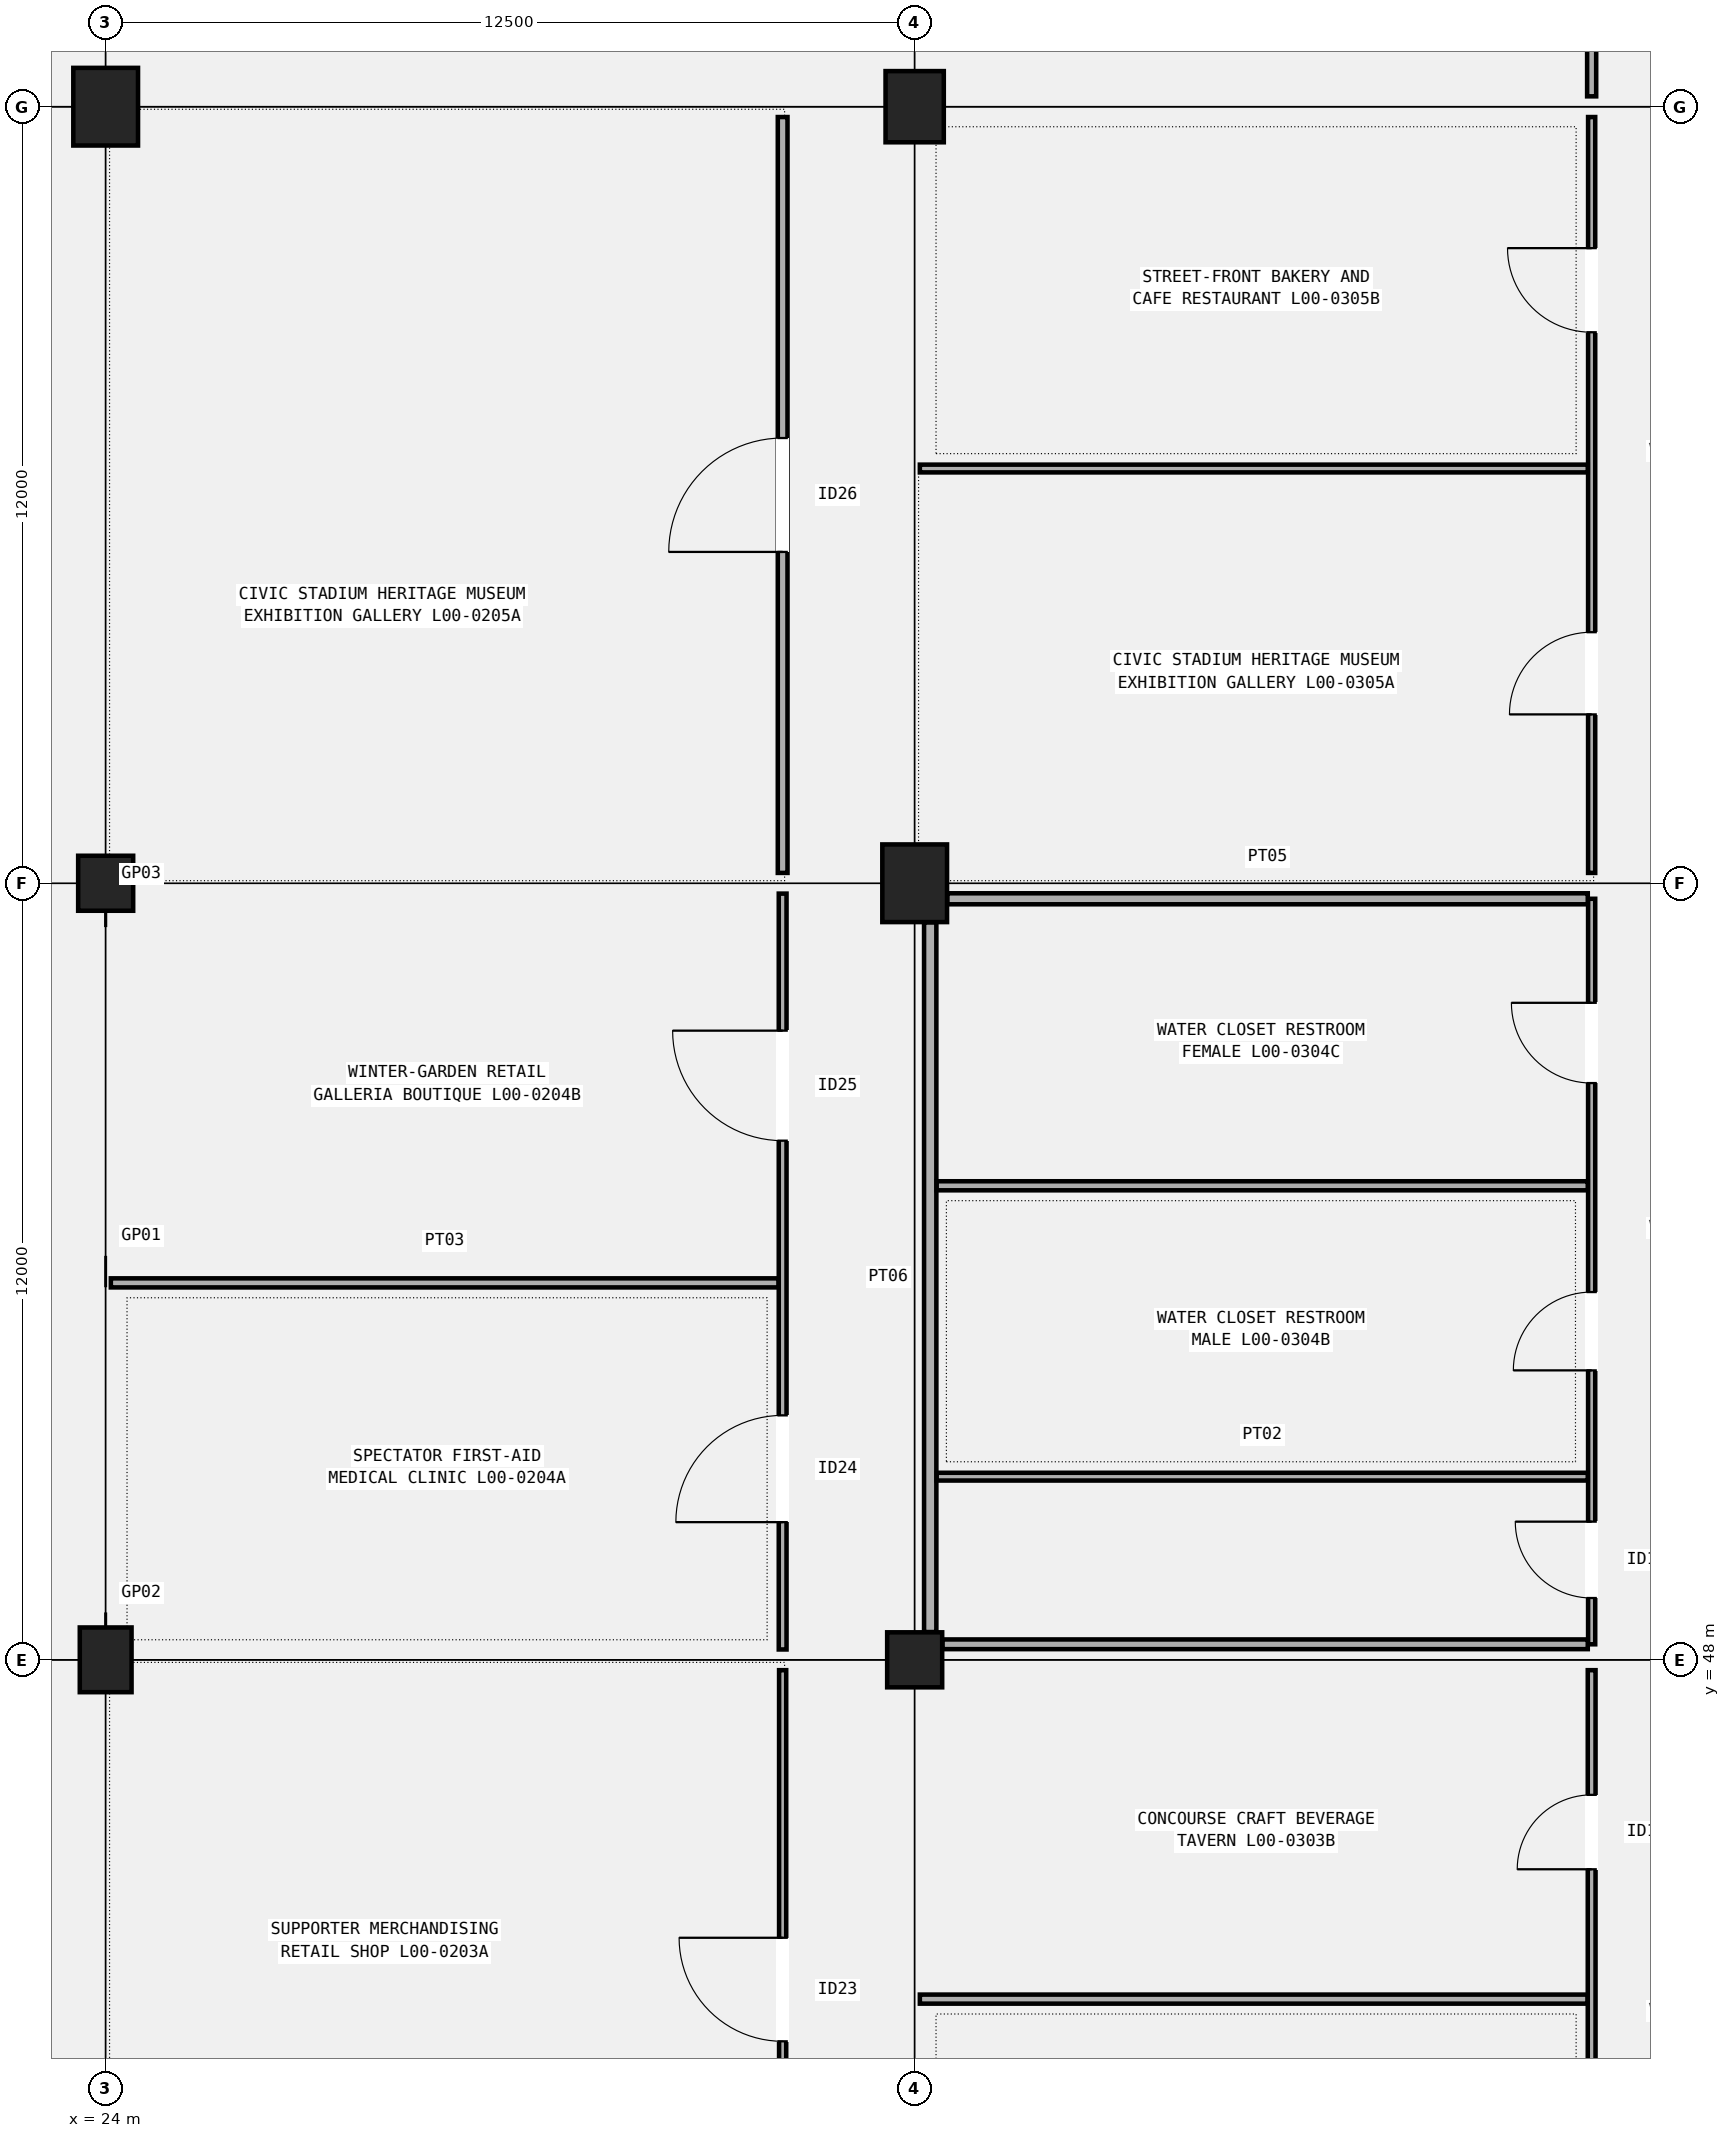
"""IFC4 building model, lengths in metres.
Left out: names, types, materials, properties, quantities, classifications, styles, units other than length and angle.
Written with IfcOpenShell. Run it as: python <this file> out.ifc"""

import sys

from ifc_helpers import new_model, si_unit, direction, frame, frame_2d, origin, origin_2d, place, context, subcontext, project, spatial, rectangle, circle, extrude, element, fill, save


model = new_model("IFC4")
c1 = context("Model", 3, precision=1e-05, world=origin(), true_north=direction((0.0, 1.0)))
c2 = subcontext(c1, "Body", "Model", "MODEL_VIEW")
j1 = project(units=[si_unit("LENGTHUNIT", "METRE"), si_unit("PLANEANGLEUNIT", "RADIAN")], contexts=[c1])
p1 = place(None, origin())
s1 = spatial("IfcSite", under=j1, at=p1, CompositionType="ELEMENT")
p2 = place(p1, origin())
s2 = spatial("IfcBuilding", under=s1, at=p2, CompositionType="ELEMENT")
p3 = place(p2, origin())
s3 = spatial("IfcBuildingStorey", under=s2, at=p3, CompositionType="ELEMENT", Elevation=0.0)
p4 = place(p3, frame((24.0, 48.0, 0.0), z_axis=(0.0, 0.0, 1.0), x_axis=(1.0, 0.0, 0.0)))
e1 = element("IfcColumn", 1, at=p4, inside=s3, PredefinedType="COLUMN", context=c2, shape_type="SweptSolid", body=[
    extrude(rectangle(XDim=0.8, YDim=1.0, at=origin_2d()), origin(), (0.0, 0.0, 1.0), 5.4),
])
p5 = place(p3, frame((24.0, 60.0, 0.0), z_axis=(0.0, 0.0, 1.0), x_axis=(1.0, 0.0, 0.0)))
e2 = element("IfcColumn", 2, at=p5, inside=s3, PredefinedType="COLUMN", context=c2, shape_type="SweptSolid", body=[
    extrude(circle(Radius=0.425, at=origin_2d()), origin(), (0.0, 0.0, 1.0), 5.4),
])
p6 = place(p3, frame((24.0, 72.0, 0.0), z_axis=(0.0, 0.0, 1.0), x_axis=(1.0, 0.0, 0.0)))
e3 = element("IfcColumn", 3, at=p6, inside=s3, PredefinedType="COLUMN", context=c2, shape_type="SweptSolid", body=[
    extrude(rectangle(XDim=1.0, YDim=1.2, at=origin_2d()), origin(), (0.0, 0.0, 1.0), 5.4),
])
p7 = place(p3, frame((36.5, 48.0, 0.0), z_axis=(0.0, 0.0, 1.0), x_axis=(1.0, 0.0, 0.0)))
e4 = element("IfcColumn", 4, at=p7, inside=s3, PredefinedType="COLUMN", context=c2, shape_type="SweptSolid", body=[
    extrude(circle(Radius=0.425, at=origin_2d()), origin(), (0.0, 0.0, 1.0), 5.4),
])
p8 = place(p3, frame((36.5, 60.0, 0.0), z_axis=(0.0, 0.0, 1.0), x_axis=(1.0, 0.0, 0.0)))
e5 = element("IfcColumn", 5, at=p8, inside=s3, PredefinedType="COLUMN", context=c2, shape_type="SweptSolid", body=[
    extrude(rectangle(XDim=1.0, YDim=1.2, at=origin_2d()), origin(), (0.0, 0.0, 1.0), 5.4),
])
p9 = place(p3, frame((36.5, 72.0, 0.0), z_axis=(0.0, 0.0, 1.0), x_axis=(1.0, 0.0, 0.0)))
e6 = element("IfcColumn", 6, at=p9, inside=s3, PredefinedType="COLUMN", context=c2, shape_type="SweptSolid", body=[
    extrude(rectangle(XDim=0.9, YDim=1.1, at=origin_2d()), origin(), (0.0, 0.0, 1.0), 5.4),
])
p10 = place(p3, frame((34.46, 37.97, 0.0), z_axis=(0.0, 0.0, 1.0), x_axis=(0.0, 1.0, 0.0)))
e7 = element("IfcWall", 7, at=p10, inside=s3, PredefinedType="PARTITIONING", context=c2, shape_type="SweptSolid", body=[
    extrude(rectangle(XDim=9.87, YDim=0.11, at=frame_2d((4.935, 0.0))), origin(), (0.0, 0.0, 1.0), 4.52),
])
p11 = place(p10, frame((4.135, 0.0, 0.0)))
e8 = element("IfcOpeningElement", 8, at=p11, cuts=e7, PredefinedType="OPENING", context=c2, shape_type="SweptSolid", body=[
    extrude(rectangle(XDim=1.6, YDim=2.3, at=frame_2d((0.8, 1.15))), frame((0.0, 0.065, 0.0), z_axis=(0.0, -1.0, 0.0), x_axis=(1.0, 0.0, 0.0)), (0.0, 0.0, 1.0), 0.13),
])
p12 = place(p3, frame((34.46, 48.16, 0.0), z_axis=(0.0, 0.0, 1.0), x_axis=(0.0, 1.0, 0.0)))
e9 = element("IfcWall", 9, at=p12, inside=s3, PredefinedType="PARTITIONING", context=c2, shape_type="SweptSolid", body=[
    extrude(rectangle(XDim=11.68, YDim=0.12, at=frame_2d((5.84, 0.0))), origin(), (0.0, 0.0, 1.0), 4.52),
])
p13 = place(p12, frame((1.967, 0.0, 0.0)))
e10 = element("IfcOpeningElement", 10, at=p13, cuts=e9, PredefinedType="OPENING", context=c2, shape_type="SweptSolid", body=[
    extrude(rectangle(XDim=1.65, YDim=2.28, at=frame_2d((0.825, 1.14))), frame((0.0, 0.07, 0.0), z_axis=(0.0, -1.0, 0.0), x_axis=(1.0, 0.0, 0.0)), (0.0, 0.0, 1.0), 0.14),
])
p14 = place(p12, frame((7.862, 0.0, 0.0)))
e11 = element("IfcOpeningElement", 11, at=p14, cuts=e9, PredefinedType="OPENING", context=c2, shape_type="SweptSolid", body=[
    extrude(rectangle(XDim=1.7, YDim=2.32, at=frame_2d((0.85, 1.16))), frame((0.0, 0.07, 0.0), z_axis=(0.0, -1.0, 0.0), x_axis=(1.0, 0.0, 0.0)), (0.0, 0.0, 1.0), 0.14),
])
p15 = place(p3, frame((24.08, 53.825, 0.0), z_axis=(0.0, 0.0, 1.0), x_axis=(1.0, 0.0, 0.0)))
e12 = element("IfcWall", 12, at=p15, inside=s3, PredefinedType="PARTITIONING", context=c2, shape_type="SweptSolid", body=[
    extrude(rectangle(XDim=10.315, YDim=0.14, at=frame_2d((5.157, 0.0))), origin(), (0.0, 0.0, 1.0), 4.52),
])
p16 = place(p3, frame((34.46, 60.16, 0.0), z_axis=(0.0, 0.0, 1.0), x_axis=(0.0, 1.0, 0.0)))
e13 = element("IfcWall", 13, at=p16, inside=s3, PredefinedType="PARTITIONING", context=c2, shape_type="SweptSolid", body=[
    extrude(rectangle(XDim=11.68, YDim=0.15, at=frame_2d((5.84, 0.0))), origin(), (0.0, 0.0, 1.0), 4.52),
])
p17 = place(p16, frame((4.96, 0.0, 0.0)))
e14 = element("IfcOpeningElement", 14, at=p17, cuts=e13, PredefinedType="OPENING", context=c2, shape_type="SweptSolid", body=[
    extrude(rectangle(XDim=1.76, YDim=2.3, at=frame_2d((0.88, 1.15))), frame((0.0, 0.085, 0.0), z_axis=(0.0, -1.0, 0.0), x_axis=(1.0, 0.0, 0.0)), (0.0, 0.0, 1.0), 0.17),
])
p18 = place(p3, frame((46.96, 37.97, 0.0), z_axis=(0.0, 0.0, 1.0), x_axis=(0.0, 1.0, 0.0)))
e15 = element("IfcWall", 15, at=p18, inside=s3, PredefinedType="PARTITIONING", context=c2, shape_type="SweptSolid", body=[
    extrude(rectangle(XDim=9.87, YDim=0.12, at=frame_2d((4.935, 0.0))), origin(), (0.0, 0.0, 1.0), 4.52),
])
p19 = place(p18, frame((1.793, 0.0, 0.0)))
e16 = element("IfcOpeningElement", 16, at=p19, cuts=e15, PredefinedType="OPENING", context=c2, shape_type="SweptSolid", body=[
    extrude(rectangle(XDim=1.12, YDim=2.18, at=frame_2d((0.56, 1.09))), frame((0.0, 0.07, 0.0), z_axis=(0.0, -1.0, 0.0), x_axis=(1.0, 0.0, 0.0)), (0.0, 0.0, 1.0), 0.14),
])
p20 = place(p18, frame((6.793, 0.0, 0.0)))
e17 = element("IfcOpeningElement", 17, at=p20, cuts=e15, PredefinedType="OPENING", context=c2, shape_type="SweptSolid", body=[
    extrude(rectangle(XDim=1.15, YDim=2.15, at=frame_2d((0.575, 1.075))), frame((0.0, 0.07, 0.0), z_axis=(0.0, -1.0, 0.0), x_axis=(1.0, 0.0, 0.0)), (0.0, 0.0, 1.0), 0.14),
])
p21 = place(p3, frame((36.58, 42.757, 0.0), z_axis=(0.0, 0.0, 1.0), x_axis=(1.0, 0.0, 0.0)))
e18 = element("IfcWall", 18, at=p21, inside=s3, PredefinedType="PARTITIONING", context=c2, shape_type="SweptSolid", body=[
    extrude(rectangle(XDim=10.315, YDim=0.14, at=frame_2d((5.157, 0.0))), origin(), (0.0, 0.0, 1.0), 4.52),
])
p22 = place(p3, frame((46.96, 48.24, 0.0), z_axis=(0.0, 0.0, 1.0), x_axis=(0.0, 1.0, 0.0)))
e19 = element("IfcWall", 19, at=p22, inside=s3, PredefinedType="PARTITIONING", context=c2, shape_type="SweptSolid", body=[
    extrude(rectangle(XDim=11.52, YDim=0.11, at=frame_2d((5.76, 0.0))), origin(), (0.0, 0.0, 1.0), 4.52),
])
p23 = place(p22, frame((0.715, 0.0, 0.0)))
e20 = element("IfcOpeningElement", 20, at=p23, cuts=e19, PredefinedType="OPENING", context=c2, shape_type="SweptSolid", body=[
    extrude(rectangle(XDim=1.18, YDim=2.2, at=frame_2d((0.59, 1.1))), frame((0.0, 0.065, 0.0), z_axis=(0.0, -1.0, 0.0), x_axis=(1.0, 0.0, 0.0)), (0.0, 0.0, 1.0), 0.13),
])
p24 = place(p22, frame((4.233, 0.0, 0.0)))
e21 = element("IfcOpeningElement", 21, at=p24, cuts=e19, PredefinedType="OPENING", context=c2, shape_type="SweptSolid", body=[
    extrude(rectangle(XDim=1.21, YDim=2.18, at=frame_2d((0.605, 1.09))), frame((0.0, 0.065, 0.0), z_axis=(0.0, -1.0, 0.0), x_axis=(1.0, 0.0, 0.0)), (0.0, 0.0, 1.0), 0.13),
])
p25 = place(p22, frame((8.673, 0.0, 0.0)))
e22 = element("IfcOpeningElement", 22, at=p25, cuts=e19, PredefinedType="OPENING", context=c2, shape_type="SweptSolid", body=[
    extrude(rectangle(XDim=1.24, YDim=2.22, at=frame_2d((0.62, 1.11))), frame((0.0, 0.065, 0.0), z_axis=(0.0, -1.0, 0.0), x_axis=(1.0, 0.0, 0.0)), (0.0, 0.0, 1.0), 0.13),
])
p26 = place(p3, frame((36.929, 48.24, 0.0), z_axis=(0.0, 0.0, 1.0), x_axis=(1.0, 0.0, 0.0)))
e23 = element("IfcWall", 23, at=p26, inside=s3, PredefinedType="PARTITIONING", context=c2, shape_type="SweptSolid", body=[
    extrude(rectangle(XDim=9.971, YDim=0.15, at=frame_2d((4.985, 0.0))), origin(), (0.0, 0.0, 1.0), 4.3),
])
p27 = place(p3, frame((37.004, 59.76, 0.0), z_axis=(0.0, 0.0, 1.0), x_axis=(1.0, 0.0, 0.0)))
e24 = element("IfcWall", 24, at=p27, inside=s3, PredefinedType="PARTITIONING", context=c2, shape_type="SweptSolid", body=[
    extrude(rectangle(XDim=9.896, YDim=0.17, at=frame_2d((4.948, 0.0))), origin(), (0.0, 0.0, 1.0), 4.05),
])
p28 = place(p3, frame((36.74, 48.429, 0.0), z_axis=(0.0, 0.0, 1.0), x_axis=(0.0, 1.0, 0.0)))
e25 = element("IfcWall", 25, at=p28, inside=s3, PredefinedType="PARTITIONING", context=c2, shape_type="SweptSolid", body=[
    extrude(rectangle(XDim=10.967, YDim=0.19, at=frame_2d((5.483, 0.0))), origin(), (0.0, 0.0, 1.0), 4.3),
])
p29 = place(p3, frame((36.84, 50.83, 0.0), z_axis=(0.0, 0.0, 1.0), x_axis=(1.0, 0.0, 0.0)))
e26 = element("IfcWall", 26, at=p29, inside=s3, PredefinedType="PARTITIONING", context=c2, shape_type="SweptSolid", body=[
    extrude(rectangle(XDim=10.06, YDim=0.12, at=frame_2d((5.03, 0.0))), origin(), (0.0, 0.0, 1.0), 4.52),
])
p30 = place(p3, frame((36.84, 55.325, 0.0), z_axis=(0.0, 0.0, 1.0), x_axis=(1.0, 0.0, 0.0)))
e27 = element("IfcWall", 27, at=p30, inside=s3, PredefinedType="PARTITIONING", context=c2, shape_type="SweptSolid", body=[
    extrude(rectangle(XDim=10.06, YDim=0.14, at=frame_2d((5.03, 0.0))), origin(), (0.0, 0.0, 1.0), 4.52),
])
p31 = place(p3, frame((46.96, 60.16, 0.0), z_axis=(0.0, 0.0, 1.0), x_axis=(0.0, 1.0, 0.0)))
e28 = element("IfcWall", 28, at=p31, inside=s3, PredefinedType="PARTITIONING", context=c2, shape_type="SweptSolid", body=[
    extrude(rectangle(XDim=11.68, YDim=0.11, at=frame_2d((5.84, 0.0))), origin(), (0.0, 0.0, 1.0), 4.52),
])
p32 = place(p31, frame((2.449, 0.0, 0.0)))
e29 = element("IfcOpeningElement", 29, at=p32, cuts=e28, PredefinedType="OPENING", context=c2, shape_type="SweptSolid", body=[
    extrude(rectangle(XDim=1.27, YDim=2.2, at=frame_2d((0.635, 1.1))), frame((0.0, 0.065, 0.0), z_axis=(0.0, -1.0, 0.0), x_axis=(1.0, 0.0, 0.0)), (0.0, 0.0, 1.0), 0.13),
])
p33 = place(p31, frame((8.354, 0.0, 0.0)))
e30 = element("IfcOpeningElement", 30, at=p33, cuts=e28, PredefinedType="OPENING", context=c2, shape_type="SweptSolid", body=[
    extrude(rectangle(XDim=1.3, YDim=2.24, at=frame_2d((0.65, 1.12))), frame((0.0, 0.065, 0.0), z_axis=(0.0, -1.0, 0.0), x_axis=(1.0, 0.0, 0.0)), (0.0, 0.0, 1.0), 0.13),
])
p34 = place(p3, frame((36.58, 66.409, 0.0), z_axis=(0.0, 0.0, 1.0), x_axis=(1.0, 0.0, 0.0)))
e31 = element("IfcWall", 31, at=p34, inside=s3, PredefinedType="PARTITIONING", context=c2, shape_type="SweptSolid", body=[
    extrude(rectangle(XDim=10.32, YDim=0.12, at=frame_2d((5.16, 0.0))), origin(), (0.0, 0.0, 1.0), 4.52),
])
p35 = place(p3, frame((46.96, 72.16, 0.0), z_axis=(0.0, 0.0, 1.0), x_axis=(0.0, 1.0, 0.0)))
e32 = element("IfcWall", 32, at=p35, inside=s3, PredefinedType="PARTITIONING", context=c2, shape_type="SweptSolid", body=[
    extrude(rectangle(XDim=11.68, YDim=0.14, at=frame_2d((5.84, 0.0))), origin(), (0.0, 0.0, 1.0), 4.52),
])
p36 = place(p35, frame((5.175, 0.0, 0.0)))
e33 = element("IfcOpeningElement", 33, at=p36, cuts=e32, PredefinedType="OPENING", context=c2, shape_type="SweptSolid", body=[
    extrude(rectangle(XDim=1.33, YDim=2.22, at=frame_2d((0.665, 1.11))), frame((0.0, 0.08, 0.0), z_axis=(0.0, -1.0, 0.0), x_axis=(1.0, 0.0, 0.0)), (0.0, 0.0, 1.0), 0.16),
])
p37 = place(p11, origin())
e34 = element("IfcDoor", 34, at=p37, inside=s3, OperationType="SINGLE_SWING_RIGHT", PredefinedType="DOOR", context=c2, shape_type="SweptSolid", body=[
    extrude(rectangle(XDim=1.6, YDim=2.3, at=frame_2d((0.8, 1.15))), frame((0.0, 0.025, 0.0), z_axis=(0.0, -1.0, 0.0), x_axis=(1.0, 0.0, 0.0)), (0.0, 0.0, 1.0), 0.05),
])
fill(e8, e34)
p38 = place(p13, origin())
e35 = element("IfcDoor", 35, at=p38, inside=s3, OperationType="SINGLE_SWING_LEFT", PredefinedType="DOOR", context=c2, shape_type="SweptSolid", body=[
    extrude(rectangle(XDim=1.65, YDim=2.28, at=frame_2d((0.825, 1.14))), frame((0.0, 0.025, 0.0), z_axis=(0.0, -1.0, 0.0), x_axis=(1.0, 0.0, 0.0)), (0.0, 0.0, 1.0), 0.05),
])
fill(e10, e35)
p39 = place(p14, origin())
e36 = element("IfcDoor", 36, at=p39, inside=s3, OperationType="SINGLE_SWING_RIGHT", PredefinedType="DOOR", context=c2, shape_type="SweptSolid", body=[
    extrude(rectangle(XDim=1.7, YDim=2.32, at=frame_2d((0.85, 1.16))), frame((0.0, 0.025, 0.0), z_axis=(0.0, -1.0, 0.0), x_axis=(1.0, 0.0, 0.0)), (0.0, 0.0, 1.0), 0.05),
])
fill(e11, e36)
p40 = place(p17, origin())
e37 = element("IfcDoor", 37, at=p40, inside=s3, OperationType="SINGLE_SWING_LEFT", PredefinedType="DOOR", context=c2, shape_type="SweptSolid", body=[
    extrude(rectangle(XDim=1.76, YDim=2.3, at=frame_2d((0.88, 1.15))), frame((0.0, 0.025, 0.0), z_axis=(0.0, -1.0, 0.0), x_axis=(1.0, 0.0, 0.0)), (0.0, 0.0, 1.0), 0.05),
])
fill(e14, e37)
p41 = place(p20, origin())
e38 = element("IfcDoor", 38, at=p41, inside=s3, OperationType="SINGLE_SWING_LEFT", PredefinedType="DOOR", context=c2, shape_type="SweptSolid", body=[
    extrude(rectangle(XDim=1.15, YDim=2.15, at=frame_2d((0.575, 1.075))), frame((0.0, 0.025, 0.0), z_axis=(0.0, -1.0, 0.0), x_axis=(1.0, 0.0, 0.0)), (0.0, 0.0, 1.0), 0.05),
])
fill(e17, e38)
p42 = place(p23, origin())
e39 = element("IfcDoor", 39, at=p42, inside=s3, OperationType="SINGLE_SWING_RIGHT", PredefinedType="DOOR", context=c2, shape_type="SweptSolid", body=[
    extrude(rectangle(XDim=1.18, YDim=2.2, at=frame_2d((0.59, 1.1))), frame((0.0, 0.025, 0.0), z_axis=(0.0, -1.0, 0.0), x_axis=(1.0, 0.0, 0.0)), (0.0, 0.0, 1.0), 0.05),
])
fill(e20, e39)
p43 = place(p24, origin())
e40 = element("IfcDoor", 40, at=p43, inside=s3, OperationType="SINGLE_SWING_LEFT", PredefinedType="DOOR", context=c2, shape_type="SweptSolid", body=[
    extrude(rectangle(XDim=1.21, YDim=2.18, at=frame_2d((0.605, 1.09))), frame((0.0, 0.025, 0.0), z_axis=(0.0, -1.0, 0.0), x_axis=(1.0, 0.0, 0.0)), (0.0, 0.0, 1.0), 0.05),
])
fill(e21, e40)
p44 = place(p25, origin())
e41 = element("IfcDoor", 41, at=p44, inside=s3, OperationType="SINGLE_SWING_RIGHT", PredefinedType="DOOR", context=c2, shape_type="SweptSolid", body=[
    extrude(rectangle(XDim=1.24, YDim=2.22, at=frame_2d((0.62, 1.11))), frame((0.0, 0.025, 0.0), z_axis=(0.0, -1.0, 0.0), x_axis=(1.0, 0.0, 0.0)), (0.0, 0.0, 1.0), 0.05),
])
fill(e22, e41)
p45 = place(p32, origin())
e42 = element("IfcDoor", 42, at=p45, inside=s3, OperationType="SINGLE_SWING_LEFT", PredefinedType="DOOR", context=c2, shape_type="SweptSolid", body=[
    extrude(rectangle(XDim=1.27, YDim=2.2, at=frame_2d((0.635, 1.1))), frame((0.0, 0.025, 0.0), z_axis=(0.0, -1.0, 0.0), x_axis=(1.0, 0.0, 0.0)), (0.0, 0.0, 1.0), 0.05),
])
fill(e29, e42)
p46 = place(p33, origin())
e43 = element("IfcDoor", 43, at=p46, inside=s3, OperationType="SINGLE_SWING_RIGHT", PredefinedType="DOOR", context=c2, shape_type="SweptSolid", body=[
    extrude(rectangle(XDim=1.3, YDim=2.24, at=frame_2d((0.65, 1.12))), frame((0.0, 0.025, 0.0), z_axis=(0.0, -1.0, 0.0), x_axis=(1.0, 0.0, 0.0)), (0.0, 0.0, 1.0), 0.05),
])
fill(e30, e43)
save(model, sys.argv[1])
